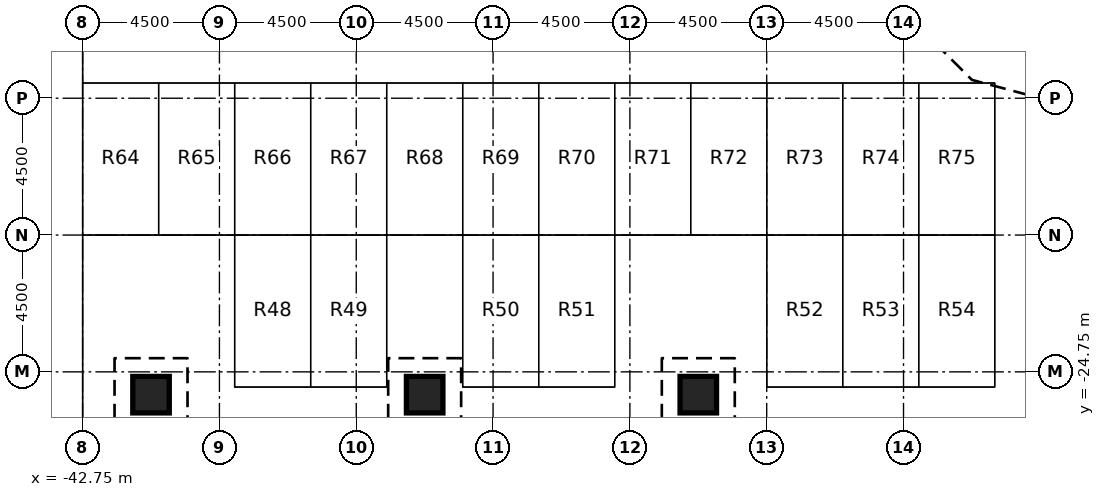
"""IFC4 building model, lengths in metres.
Left out: names, types, materials, properties, quantities, classifications, styles, units other than length and angle.
Written with IfcOpenShell. Run it as: python <this file> out.ifc"""

import sys

from ifc_helpers import new_model, si_unit, direction, frame, origin, origin_2d, place, context, subcontext, project, spatial, rectangle, extrude, element, save


model = new_model("IFC4")
c1 = context("Model", 3, precision=1e-05, world=origin(), true_north=direction((0.0, 1.0)))
c2 = subcontext(c1, "Body", "Model", "MODEL_VIEW")
j1 = project(units=[si_unit("LENGTHUNIT", "METRE"), si_unit("PLANEANGLEUNIT", "RADIAN")], contexts=[c1])
p1 = place(None, origin())
s1 = spatial("IfcSite", under=j1, at=p1, CompositionType="ELEMENT")
p2 = place(p1, origin())
s2 = spatial("IfcBuilding", under=s1, at=p2, CompositionType="ELEMENT")
p3 = place(p2, frame((0.0, 0.0, -8.0)))
s3 = spatial("IfcBuildingStorey", under=s2, at=p3, CompositionType="ELEMENT", Elevation=-8.0)
for number, where, z_axis, x_axis in (
    (1, (-40.5, -25.5, 0.0), (0.0, 0.0, 1.0), (1.0, 0.0, 0.0)),
    (2, (-31.5, -25.5, 0.0), (0.0, 0.0, 1.0), (1.0, 0.0, 0.0)),
    (3, (-22.5, -25.5, 0.0), (0.0, 0.0, 1.0), (1.0, 0.0, 0.0)),
):
    element("IfcColumn", number, at=place(p3, frame(where, z_axis=z_axis, x_axis=x_axis)), inside=s3, PredefinedType="COLUMN", context=c2, shape_type="SweptSolid", body=[
        extrude(rectangle(XDim=1.2, YDim=1.2, at=origin_2d()), origin(), (0.0, 0.0, 1.0), 3.4),
    ])
save(model, sys.argv[1])
